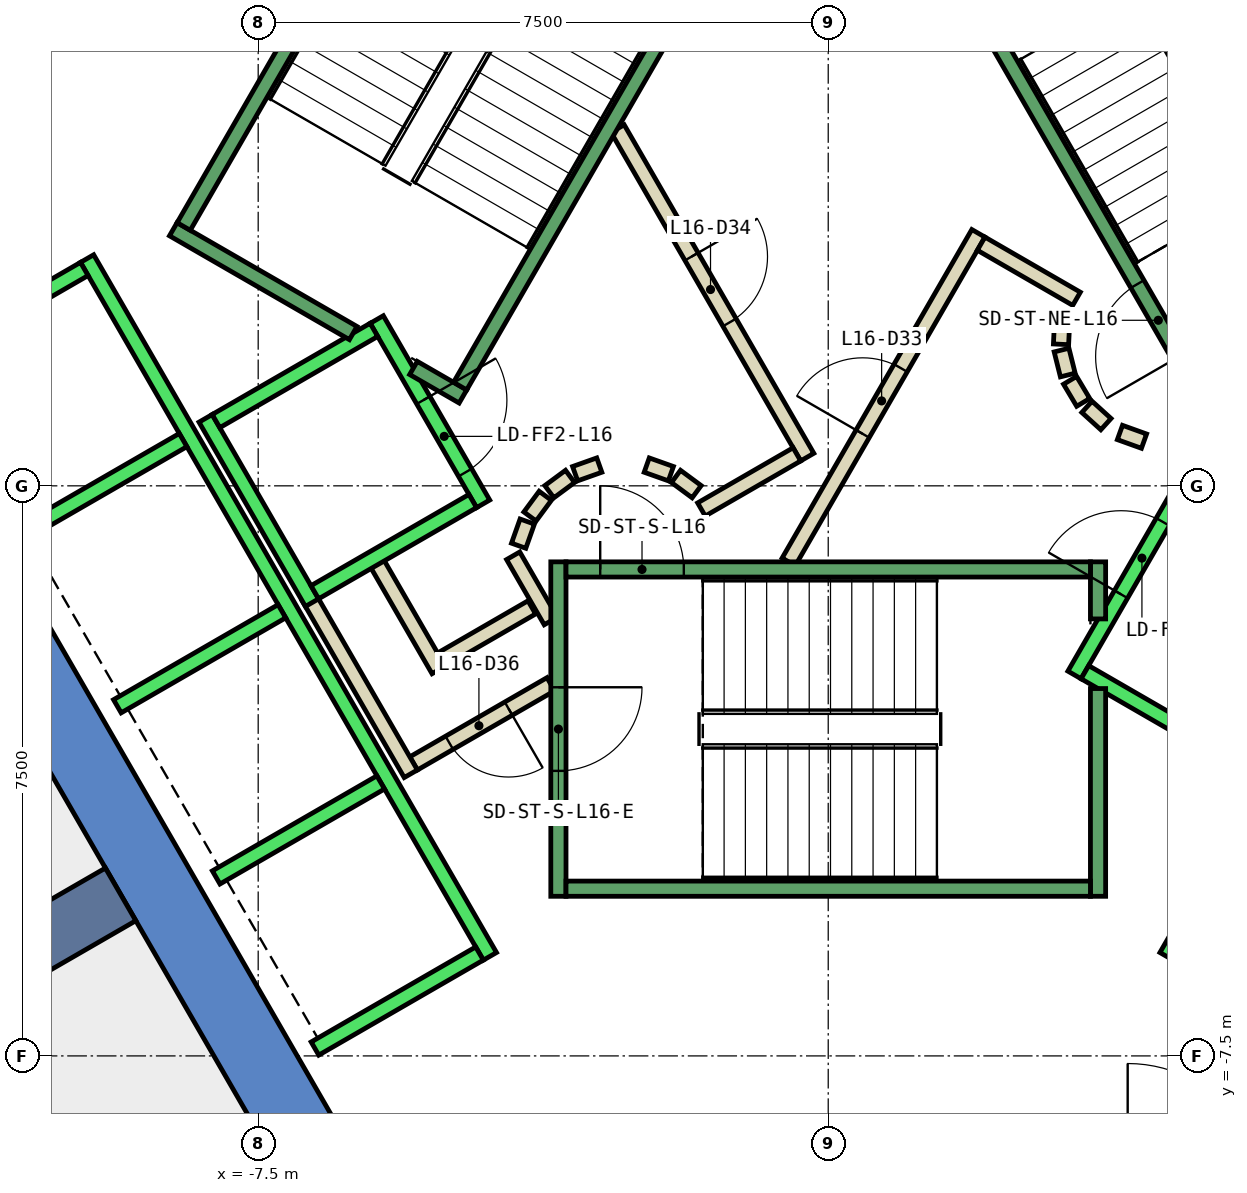
"""IFC4 building model, lengths in metres.
Left out: names, types, materials, properties, quantities, classifications, styles, units other than length and angle.
Written with IfcOpenShell. Run it as: python <this file> out.ifc"""

import sys

from ifc_helpers import new_model, si_unit, direction, frame, frame_2d, origin, place, context, subcontext, project, spatial, polyline, rectangle, outline, extrude, element, fill, save


model = new_model("IFC4")
c1 = context("Model", 3, precision=1e-05, world=origin(), true_north=direction((0.0, 1.0)))
c2 = subcontext(c1, "Body", "Model", "MODEL_VIEW")
j1 = project(units=[si_unit("LENGTHUNIT", "METRE"), si_unit("PLANEANGLEUNIT", "RADIAN")], contexts=[c1])
p1 = place(None, origin())
s1 = spatial("IfcSite", under=j1, at=p1, CompositionType="ELEMENT")
p2 = place(p1, origin())
s2 = spatial("IfcBuilding", under=s1, at=p2, CompositionType="ELEMENT")
p3 = place(p2, frame((0.0, 0.0, 77.0)))
s3 = spatial("IfcBuildingStorey", under=s2, at=p3, CompositionType="ELEMENT", Elevation=77.0)
p4 = place(p3, frame((0.0, 0.0, -0.4)))
e1 = element("IfcWall", 1, at=p4, inside=s3, PredefinedType="SHEAR", context=c2, shape_type="SweptSolid", body=[
    extrude(outline(polyline([(-12.267, 5.252), (-11.444, 4.777), (-6.38, 13.55), (-6.928, 14.5), (-12.267, 5.252)])), origin(), (0.0, 0.0, 1.0), 4.0),
])
p5 = place(p3, frame((0.0, 0.0, -0.4)))
e2 = element("IfcWall", 2, at=p5, inside=s3, PredefinedType="SHEAR", context=c2, shape_type="SweptSolid", body=[
    extrude(outline(polyline([(-13.856, 2.5), (-6.928, -9.5), (-6.38, -8.55), (-12.759, 2.5), (-13.856, 2.5)])), origin(), (0.0, 0.0, 1.0), 4.0),
])
p6 = place(p3, frame((-9.31, -5.375, -0.4), z_axis=(0.0, 0.0, 1.0), x_axis=(-0.866017533419, -0.500013631625, 0.0)))
e3 = element("IfcWall", 3, at=p6, inside=s3, PredefinedType="SHEAR", context=c2, shape_type="SweptSolid", body=[
    extrude(rectangle(XDim=9.0, YDim=0.8, at=frame_2d((4.5, 0.0))), origin(), (0.0, 0.0, 1.0), 4.0),
])
p7 = place(p3, frame((-3.9, -1.599, 0.0), z_axis=(0.0, 0.0, 1.0), x_axis=(-0.865969445389, -0.500096910261, 0.0)))
e4 = element("IfcWall", 4, at=p7, inside=s3, PredefinedType="PARTITIONING", context=c2, shape_type="SweptSolid", body=[
    extrude(rectangle(XDim=1.373, YDim=0.2, at=frame_2d((0.687, 0.0))), origin(), (0.0, 0.0, 1.0), 3.6),
])
p8 = place(p3, frame((-5.126, -2.422, 0.0), z_axis=(0.0, 0.0, 1.0), x_axis=(-0.500062241894, 0.865989465428, 0.0)))
e5 = element("IfcWall", 5, at=p8, inside=s3, PredefinedType="PARTITIONING", context=c2, shape_type="SweptSolid", body=[
    extrude(rectangle(XDim=1.7, YDim=0.2, at=frame_2d((0.85, 0.0))), origin(), (0.0, 0.0, 1.0), 3.6),
])
p9 = place(p3, frame((-3.65, -2.61, 0.0), z_axis=(0.0, 0.0, 1.0), x_axis=(-0.866072462134, -0.499918483688, 0.0)))
e6 = element("IfcWall", 6, at=p9, inside=s3, PredefinedType="PARTITIONING", context=c2, shape_type="SweptSolid", body=[
    extrude(rectangle(XDim=2.084, YDim=0.2, at=frame_2d((1.042, 0.0))), origin(), (0.0, 0.0, 1.0), 3.6),
])
p10 = place(p9, frame((0.642, 0.0, 0.0)))
e7 = element("IfcOpeningElement", 7, at=p10, cuts=e6, PredefinedType="OPENING", context=c2, shape_type="SweptSolid", body=[
    extrude(rectangle(XDim=0.9, YDim=2.1, at=frame_2d((0.45, 1.05))), frame((0.0, 0.11, 0.0), z_axis=(0.0, -1.0, 0.0), x_axis=(1.0, 0.0, 0.0)), (0.0, 0.0, 1.0), 0.22),
])
p11 = place(p3, frame((-5.492, -3.788, 0.0), z_axis=(0.0, 0.0, 1.0), x_axis=(-0.500008949224, 0.866020236886, 0.0)))
e8 = element("IfcWall", 8, at=p11, inside=s3, PredefinedType="PARTITIONING", context=c2, shape_type="SweptSolid", body=[
    extrude(rectangle(XDim=2.68, YDim=0.2, at=frame_2d((1.34, 0.0))), origin(), (0.0, 0.0, 1.0), 3.6),
])
p12 = place(p3, frame((-4.145, -0.92, 0.0), z_axis=(0.0, 0.0, 1.0), x_axis=(0.499743786207, -0.866173278362, 0.0)))
e9 = element("IfcWall", 9, at=p12, inside=s3, PredefinedType="PARTITIONING", context=c2, shape_type="SweptSolid", body=[
    extrude(rectangle(XDim=0.991, YDim=0.2, at=frame_2d((0.495, 0.0))), origin(), (0.0, 0.0, 1.0), 3.6),
])
p13 = place(p3, frame((-0.52, -1.0, 0.0), z_axis=(0.0, 0.0, 1.0), x_axis=(0.50011622646, 0.865958290007, 0.0)))
e10 = element("IfcWall", 10, at=p13, inside=s3, PredefinedType="PARTITIONING", context=c2, shape_type="SweptSolid", body=[
    extrude(rectangle(XDim=4.991, YDim=0.2, at=frame_2d((2.496, 0.0))), origin(), (0.0, 0.0, 1.0), 3.6),
])
p14 = place(p13, frame((1.945, 0.0, 0.0)))
e11 = element("IfcOpeningElement", 11, at=p14, cuts=e10, PredefinedType="OPENING", context=c2, shape_type="SweptSolid", body=[
    extrude(rectangle(XDim=1.0, YDim=2.1, at=frame_2d((0.5, 1.05))), frame((0.0, 0.11, 0.0), z_axis=(0.0, -1.0, 0.0), x_axis=(1.0, 0.0, 0.0)), (0.0, 0.0, 1.0), 0.22),
])
p15 = place(p3, frame((2.012, 3.186, 0.0), z_axis=(0.0, 0.0, 1.0), x_axis=(0.865891012941, -0.500232699559, 0.0)))
e12 = element("IfcWall", 12, at=p15, inside=s3, PredefinedType="PARTITIONING", context=c2, shape_type="SweptSolid", body=[
    extrude(rectangle(XDim=1.449, YDim=0.2, at=frame_2d((0.725, 0.0))), origin(), (0.0, 0.0, 1.0), 3.6),
])
p16 = place(p3, frame((3.079, 2.199, 0.0), z_axis=(0.0, 0.0, 1.0), x_axis=(-0.047771483479, -0.998858290933, 0.0)))
e13 = element("IfcWall", 13, at=p16, inside=s3, PredefinedType="PARTITIONING", context=c2, shape_type="SweptSolid", body=[
    extrude(rectangle(XDim=0.337, YDim=0.2, at=frame_2d((0.169, 0.0))), origin(), (0.0, 0.0, 1.0), 3.6),
])
p17 = place(p3, frame((3.07, 1.786, 0.0), z_axis=(0.0, 0.0, 1.0), x_axis=(0.242705583207, -0.970099994784, 0.0)))
e14 = element("IfcWall", 14, at=p17, inside=s3, PredefinedType="PARTITIONING", context=c2, shape_type="SweptSolid", body=[
    extrude(rectangle(XDim=0.338, YDim=0.2, at=frame_2d((0.169, 0.0))), origin(), (0.0, 0.0, 1.0), 3.6),
])
for number, where, z_axis, x_axis in (
    (15, (3.182, 1.388, 0.0), (0.0, 0.0, 1.0), (0.512, -0.859, 0.0)),
    (16, (3.404, 1.039, 0.0), (0.0, 0.0, 1.0), (0.74, -0.672, 0.0)),
):
    element("IfcWall", number, at=place(p3, frame(where, z_axis=z_axis, x_axis=x_axis)), inside=s3, PredefinedType="PARTITIONING", context=c2, shape_type="SweptSolid", body=[
        extrude(rectangle(XDim=0.338, YDim=0.2, at=frame_2d((0.169, 0.0))), origin(), (0.0, 0.0, 1.0), 3.6),
    ])
p18 = place(p3, frame((3.838, 0.702, 0.0), z_axis=(0.0, 0.0, 1.0), x_axis=(0.941035081519, -0.338308993895, 0.0)))
e17 = element("IfcWall", 17, at=p18, inside=s3, PredefinedType="PARTITIONING", context=c2, shape_type="SweptSolid", body=[
    extrude(rectangle(XDim=0.337, YDim=0.2, at=frame_2d((0.168, 0.0))), origin(), (0.0, 0.0, 1.0), 3.6),
])
p19 = place(p3, frame((-2.771, 4.7, 0.0), z_axis=(0.0, 0.0, 1.0), x_axis=(0.499969479948, -0.866043023828, 0.0)))
e18 = element("IfcWall", 18, at=p19, inside=s3, PredefinedType="PARTITIONING", context=c2, shape_type="SweptSolid", body=[
    extrude(rectangle(XDim=4.99, YDim=0.2, at=frame_2d((2.495, 0.0))), origin(), (0.0, 0.0, 1.0), 3.6),
])
p20 = place(p19, frame((1.945, 0.0, 0.0)))
e19 = element("IfcOpeningElement", 19, at=p20, cuts=e18, PredefinedType="OPENING", context=c2, shape_type="SweptSolid", body=[
    extrude(rectangle(XDim=1.0, YDim=2.1, at=frame_2d((0.5, 1.05))), frame((0.0, 0.11, 0.0), z_axis=(0.0, -1.0, 0.0), x_axis=(1.0, 0.0, 0.0)), (0.0, 0.0, 1.0), 0.22),
])
p21 = place(p3, frame((-0.412, 0.414, 0.0), z_axis=(0.0, 0.0, 1.0), x_axis=(-0.866017369001, -0.500013916395, 0.0)))
e20 = element("IfcWall", 20, at=p21, inside=s3, PredefinedType="PARTITIONING", context=c2, shape_type="SweptSolid", body=[
    extrude(rectangle(XDim=1.45, YDim=0.2, at=frame_2d((0.725, 0.0))), origin(), (0.0, 0.0, 1.0), 3.6),
])
p22 = place(p3, frame((-1.731, -0.077, 0.0), z_axis=(0.0, 0.0, 1.0), x_axis=(-0.804311165252, 0.594208338422, 0.0)))
e21 = element("IfcWall", 21, at=p22, inside=s3, PredefinedType="PARTITIONING", context=c2, shape_type="SweptSolid", body=[
    extrude(rectangle(XDim=0.338, YDim=0.2, at=frame_2d((0.169, 0.0))), origin(), (0.0, 0.0, 1.0), 3.6),
])
p23 = place(p3, frame((-2.07, 0.16, 0.0), z_axis=(0.0, 0.0, 1.0), x_axis=(-0.942199461132, 0.335052496547, 0.0)))
e22 = element("IfcWall", 22, at=p23, inside=s3, PredefinedType="PARTITIONING", context=c2, shape_type="SweptSolid", body=[
    extrude(rectangle(XDim=0.337, YDim=0.2, at=frame_2d((0.169, 0.0))), origin(), (0.0, 0.0, 1.0), 3.6),
])
p24 = place(p3, frame((-3.012, 0.273, 0.0), z_axis=(0.0, 0.0, 1.0), x_axis=(-0.942280615813, -0.334824194261, 0.0)))
e23 = element("IfcWall", 23, at=p24, inside=s3, PredefinedType="PARTITIONING", context=c2, shape_type="SweptSolid", body=[
    extrude(rectangle(XDim=0.338, YDim=0.2, at=frame_2d((0.169, 0.0))), origin(), (0.0, 0.0, 1.0), 3.6),
])
p25 = place(p3, frame((-3.397, 0.124, 0.0), z_axis=(0.0, 0.0, 1.0), x_axis=(-0.804311165252, -0.594208338422, 0.0)))
e24 = element("IfcWall", 24, at=p25, inside=s3, PredefinedType="PARTITIONING", context=c2, shape_type="SweptSolid", body=[
    extrude(rectangle(XDim=0.338, YDim=0.2, at=frame_2d((0.169, 0.0))), origin(), (0.0, 0.0, 1.0), 3.6),
])
p26 = place(p3, frame((-3.723, -0.131, 0.0), z_axis=(0.0, 0.0, 1.0), x_axis=(-0.594675113454, -0.803966112121, 0.0)))
e25 = element("IfcWall", 25, at=p26, inside=s3, PredefinedType="PARTITIONING", context=c2, shape_type="SweptSolid", body=[
    extrude(rectangle(XDim=0.338, YDim=0.2, at=frame_2d((0.169, 0.0))), origin(), (0.0, 0.0, 1.0), 3.6),
])
p27 = place(p3, frame((-3.96, -0.47, 0.0), z_axis=(0.0, 0.0, 1.0), x_axis=(-0.334824194261, -0.942280615813, 0.0)))
e26 = element("IfcWall", 26, at=p27, inside=s3, PredefinedType="PARTITIONING", context=c2, shape_type="SweptSolid", body=[
    extrude(rectangle(XDim=0.338, YDim=0.2, at=frame_2d((0.169, 0.0))), origin(), (0.0, 0.0, 1.0), 3.6),
])
p28 = place(p3, frame((-5.94, 2.188, 0.0), z_axis=(0.0, 0.0, 1.0), x_axis=(0.49994636267, -0.866056369097, 0.0)))
e27 = element("IfcWall", 27, at=p28, inside=s3, PredefinedType="STANDARD", context=c2, shape_type="SweptSolid", body=[
    extrude(rectangle(XDim=2.8, YDim=0.2, at=frame_2d((1.4, 0.0))), origin(), (0.0, 0.0, 1.0), 3.6),
])
p29 = place(p28, frame((1.225, 0.0, 0.0)))
e28 = element("IfcOpeningElement", 28, at=p29, cuts=e27, PredefinedType="OPENING", context=c2, shape_type="SweptSolid", body=[
    extrude(rectangle(XDim=1.1, YDim=2.1, at=frame_2d((0.55, 1.05))), frame((0.0, 0.11, 0.0), z_axis=(0.0, -1.0, 0.0), x_axis=(1.0, 0.0, 0.0)), (0.0, 0.0, 1.0), 0.22),
])
p30 = place(p3, frame((-8.192, 0.888, 0.0), z_axis=(0.0, 0.0, 1.0), x_axis=(0.49994636267, -0.866056369097, 0.0)))
e29 = element("IfcWall", 29, at=p30, inside=s3, PredefinedType="STANDARD", context=c2, shape_type="SweptSolid", body=[
    extrude(rectangle(XDim=2.8, YDim=0.2, at=frame_2d((1.4, 0.0))), origin(), (0.0, 0.0, 1.0), 3.6),
])
for number, where, z_axis, x_axis in (
    (30, (-5.977, 2.052, 0.0), (0.0, 0.0, 1.0), (-0.866, -0.5, 0.0)),
    (31, (-4.677, -0.2, 0.0), (0.0, 0.0, 1.0), (-0.866, -0.5, 0.0)),
):
    element("IfcWall", number, at=place(p3, frame(where, z_axis=z_axis, x_axis=x_axis)), inside=s3, PredefinedType="STANDARD", context=c2, shape_type="SweptSolid", body=[
        extrude(rectangle(XDim=2.399, YDim=0.2, at=frame_2d((1.2, 0.0))), origin(), (0.0, 0.0, 1.0), 3.6),
    ])
p31 = place(p3, frame((-9.751, 2.99, 0.0), z_axis=(0.0, 0.0, 1.0), x_axis=(0.50000090737, -0.866024879913, 0.0)))
e32 = element("IfcWall", 32, at=p31, inside=s3, PredefinedType="STANDARD", context=c2, shape_type="SweptSolid", body=[
    extrude(rectangle(XDim=10.6, YDim=0.2, at=frame_2d((5.3, 0.0))), origin(), (0.0, 0.0, 1.0), 3.6),
])
p32 = place(p3, frame((-9.788, 2.853, 0.0), z_axis=(0.0, 0.0, 1.0), x_axis=(-0.865998541277, -0.500046524342, 0.0)))
e33 = element("IfcWall", 33, at=p32, inside=s3, PredefinedType="STANDARD", context=c2, shape_type="SweptSolid", body=[
    extrude(rectangle(XDim=2.5, YDim=0.2, at=frame_2d((1.25, 0.0))), origin(), (0.0, 0.0, 1.0), 3.6),
])
for number, where, z_axis, x_axis in (
    (34, (-8.488, 0.602, 0.0), (0.0, 0.0, 1.0), (-0.866, -0.5, 0.0)),
    (35, (-7.188, -1.65, 0.0), (0.0, 0.0, 1.0), (-0.866, -0.5, 0.0)),
    (36, (-5.888, -3.902, 0.0), (0.0, 0.0, 1.0), (-0.866, -0.5, 0.0)),
    (37, (-4.588, -6.153, 0.0), (0.0, 0.0, 1.0), (-0.866, -0.5, 0.0)),
):
    element("IfcWall", number, at=place(p3, frame(where, z_axis=z_axis, x_axis=x_axis)), inside=s3, PredefinedType="STANDARD", context=c2, shape_type="SweptSolid", body=[
        extrude(rectangle(XDim=2.5, YDim=0.2, at=frame_2d((1.25, 0.0))), origin(), (0.0, 0.0, 1.0), 3.6),
    ])
p33 = place(p3, frame((3.24, -2.488, 0.0), z_axis=(0.0, 0.0, 1.0), x_axis=(0.49994636267, 0.866056369097, 0.0)))
e38 = element("IfcWall", 38, at=p33, inside=s3, PredefinedType="STANDARD", context=c2, shape_type="SweptSolid", body=[
    extrude(rectangle(XDim=2.8, YDim=0.2, at=frame_2d((1.4, 0.0))), origin(), (0.0, 0.0, 1.0), 3.6),
])
p34 = place(p33, frame((1.225, 0.0, 0.0)))
e39 = element("IfcOpeningElement", 39, at=p34, cuts=e38, PredefinedType="OPENING", context=c2, shape_type="SweptSolid", body=[
    extrude(rectangle(XDim=1.1, YDim=2.1, at=frame_2d((0.55, 1.05))), frame((0.0, 0.11, 0.0), z_axis=(0.0, -1.0, 0.0), x_axis=(1.0, 0.0, 0.0)), (0.0, 0.0, 1.0), 0.22),
])
p35 = place(p3, frame((3.377, -2.452, 0.0), z_axis=(0.0, 0.0, 1.0), x_axis=(0.865955154139, -0.50012165622, 0.0)))
e40 = element("IfcWall", 40, at=p35, inside=s3, PredefinedType="STANDARD", context=c2, shape_type="SweptSolid", body=[
    extrude(rectangle(XDim=2.4, YDim=0.2, at=frame_2d((1.2, 0.0))), origin(), (0.0, 0.0, 1.0), 3.6),
])
p36 = place(p3, frame((4.451, -6.19, 0.0), z_axis=(0.0, 0.0, 1.0), x_axis=(0.50000090737, 0.866024879913, 0.0)))
e41 = element("IfcWall", 41, at=p36, inside=s3, PredefinedType="STANDARD", context=c2, shape_type="SweptSolid", body=[
    extrude(rectangle(XDim=10.6, YDim=0.2, at=frame_2d((5.3, 0.0))), origin(), (0.0, 0.0, 1.0), 3.6),
])
p37 = place(p3, frame((-3.55, -1.0, 0.0), z_axis=(0.0, 0.0, 1.0), x_axis=(0.0, -1.0, 0.0)))
e42 = element("IfcWall", 42, at=p37, inside=s3, PredefinedType="STANDARD", context=c2, shape_type="SweptSolid", body=[
    extrude(rectangle(XDim=4.4, YDim=0.2, at=frame_2d((2.2, 0.0))), origin(), (0.0, 0.0, 1.0), 3.6),
])
p38 = place(p37, frame((1.65, 0.0, 0.0)))
e43 = element("IfcOpeningElement", 43, at=p38, cuts=e42, PredefinedType="OPENING", context=c2, shape_type="SweptSolid", body=[
    extrude(rectangle(XDim=1.1, YDim=2.2, at=frame_2d((0.55, 1.1))), frame((0.0, 0.11, 0.0), z_axis=(0.0, -1.0, 0.0), x_axis=(1.0, 0.0, 0.0)), (0.0, 0.0, 1.0), 0.22),
])
p39 = place(p3, frame((3.55, -2.667, 0.0), z_axis=(0.0, 0.0, 1.0), x_axis=(0.0, -1.0, 0.0)))
e44 = element("IfcWall", 44, at=p39, inside=s3, PredefinedType="STANDARD", context=c2, shape_type="SweptSolid", body=[
    extrude(rectangle(XDim=2.733, YDim=0.2, at=frame_2d((1.366, 0.0))), origin(), (0.0, 0.0, 1.0), 3.6),
])
p40 = place(p3, frame((3.55, -1.0, 0.0), z_axis=(0.0, 0.0, 1.0), x_axis=(0.0, -1.0, 0.0)))
e45 = element("IfcWall", 45, at=p40, inside=s3, PredefinedType="STANDARD", context=c2, shape_type="SweptSolid", body=[
    extrude(rectangle(XDim=0.751, YDim=0.2, at=frame_2d((0.375, 0.0))), origin(), (0.0, 0.0, 1.0), 3.6),
])
p41 = place(p3, frame((-3.45, -1.1, 0.0), z_axis=(0.0, 0.0, 1.0), x_axis=(1.0, 0.0, 0.0)))
e46 = element("IfcWall", 46, at=p41, inside=s3, PredefinedType="STANDARD", context=c2, shape_type="SweptSolid", body=[
    extrude(rectangle(XDim=6.9, YDim=0.2, at=frame_2d((3.45, 0.0))), origin(), (0.0, 0.0, 1.0), 3.6),
])
p42 = place(p41, frame((0.45, 0.0, 0.0)))
e47 = element("IfcOpeningElement", 47, at=p42, cuts=e46, PredefinedType="OPENING", context=c2, shape_type="SweptSolid", body=[
    extrude(rectangle(XDim=1.1, YDim=2.2, at=frame_2d((0.55, 1.1))), frame((0.0, 0.11, 0.0), z_axis=(0.0, -1.0, 0.0), x_axis=(1.0, 0.0, 0.0)), (0.0, 0.0, 1.0), 0.22),
])
p43 = place(p3, frame((-3.45, -5.3, 0.0), z_axis=(0.0, 0.0, 1.0), x_axis=(1.0, 0.0, 0.0)))
e48 = element("IfcWall", 48, at=p43, inside=s3, PredefinedType="STANDARD", context=c2, shape_type="SweptSolid", body=[
    extrude(rectangle(XDim=6.9, YDim=0.2, at=frame_2d((3.45, 0.0))), origin(), (0.0, 0.0, 1.0), 3.6),
])
p44 = place(p3, frame((4.843, 1.312, 0.0), z_axis=(0.0, 0.0, 1.0), x_axis=(-0.499963383562, 0.866046543262, 0.0)))
e49 = element("IfcWall", 49, at=p44, inside=s3, PredefinedType="STANDARD", context=c2, shape_type="SweptSolid", body=[
    extrude(rectangle(XDim=6.9, YDim=0.2, at=frame_2d((3.45, 0.0))), origin(), (0.0, 0.0, 1.0), 3.6),
])
p45 = place(p44, frame((0.45, 0.0, 0.0)))
e50 = element("IfcOpeningElement", 50, at=p45, cuts=e49, PredefinedType="OPENING", context=c2, shape_type="SweptSolid", body=[
    extrude(rectangle(XDim=1.1, YDim=2.2, at=frame_2d((0.55, 1.1))), frame((0.0, 0.11, 0.0), z_axis=(0.0, -1.0, 0.0), x_axis=(1.0, 0.0, 0.0)), (0.0, 0.0, 1.0), 0.22),
])
p46 = place(p3, frame((-6.25, 2.01, 0.0), z_axis=(0.0, 0.0, 1.0), x_axis=(-0.86611865017, 0.499838457731, 0.0)))
e51 = element("IfcWall", 51, at=p46, inside=s3, PredefinedType="STANDARD", context=c2, shape_type="SweptSolid", body=[
    extrude(rectangle(XDim=2.733, YDim=0.2, at=frame_2d((1.366, 0.0))), origin(), (0.0, 0.0, 1.0), 3.6),
])
p47 = place(p3, frame((-4.806, 1.176, 0.0), z_axis=(0.0, 0.0, 1.0), x_axis=(-0.866558586415, 0.499075361355, 0.0)))
e52 = element("IfcWall", 52, at=p47, inside=s3, PredefinedType="STANDARD", context=c2, shape_type="SweptSolid", body=[
    extrude(rectangle(XDim=0.751, YDim=0.2, at=frame_2d((0.376, 0.0))), origin(), (0.0, 0.0, 1.0), 3.6),
])
p48 = place(p3, frame((-1.393, 7.288, 0.0), z_axis=(0.0, 0.0, 1.0), x_axis=(-0.499963383562, -0.866046543262, 0.0)))
e53 = element("IfcWall", 53, at=p48, inside=s3, PredefinedType="STANDARD", context=c2, shape_type="SweptSolid", body=[
    extrude(rectangle(XDim=6.9, YDim=0.2, at=frame_2d((3.45, 0.0))), origin(), (0.0, 0.0, 1.0), 3.6),
])
p49 = place(p48, frame((0.45, 0.0, 0.0)))
e54 = element("IfcOpeningElement", 54, at=p49, cuts=e53, PredefinedType="OPENING", context=c2, shape_type="SweptSolid", body=[
    extrude(rectangle(XDim=1.1, YDim=2.2, at=frame_2d((0.55, 1.1))), frame((0.0, 0.11, 0.0), z_axis=(0.0, -1.0, 0.0), x_axis=(1.0, 0.0, 0.0)), (0.0, 0.0, 1.0), 0.22),
])
p50 = place(p3, frame((-5.03, 9.388, 0.0), z_axis=(0.0, 0.0, 1.0), x_axis=(-0.499978703459, -0.866037698999, 0.0)))
e55 = element("IfcWall", 55, at=p50, inside=s3, PredefinedType="STANDARD", context=c2, shape_type="SweptSolid", body=[
    extrude(rectangle(XDim=6.9, YDim=0.2, at=frame_2d((3.45, 0.0))), origin(), (0.0, 0.0, 1.0), 3.6),
])
p51 = place(p14, origin())
e56 = element("IfcDoor", 56, at=p51, inside=s3, OperationType="SINGLE_SWING_LEFT", PredefinedType="DOOR", context=c2, shape_type="SweptSolid", body=[
    extrude(rectangle(XDim=1.0, YDim=2.1, at=frame_2d((0.5, 1.05))), frame((0.0, 0.025, 0.0), z_axis=(0.0, -1.0, 0.0), x_axis=(1.0, 0.0, 0.0)), (0.0, 0.0, 1.0), 0.05),
])
fill(e11, e56)
p52 = place(p20, origin())
e57 = element("IfcDoor", 57, at=p52, inside=s3, OperationType="SINGLE_SWING_RIGHT", PredefinedType="DOOR", context=c2, shape_type="SweptSolid", body=[
    extrude(rectangle(XDim=1.0, YDim=2.1, at=frame_2d((0.5, 1.05))), frame((0.0, 0.025, 0.0), z_axis=(0.0, -1.0, 0.0), x_axis=(1.0, 0.0, 0.0)), (0.0, 0.0, 1.0), 0.05),
])
fill(e19, e57)
p53 = place(p10, origin())
e58 = element("IfcDoor", 58, at=p53, inside=s3, OperationType="SINGLE_SWING_LEFT", PredefinedType="DOOR", context=c2, shape_type="SweptSolid", body=[
    extrude(rectangle(XDim=0.9, YDim=2.1, at=frame_2d((0.45, 1.05))), frame((0.0, 0.025, 0.0), z_axis=(0.0, -1.0, 0.0), x_axis=(1.0, 0.0, 0.0)), (0.0, 0.0, 1.0), 0.05),
])
fill(e7, e58)
p54 = place(p34, origin())
e59 = element("IfcDoor", 59, at=p54, inside=s3, OperationType="SLIDING_TO_LEFT", PredefinedType="DOOR", context=c2, shape_type="SweptSolid", body=[
    extrude(rectangle(XDim=1.1, YDim=2.1, at=frame_2d((0.55, 1.05))), frame((0.0, 0.025, 0.0), z_axis=(0.0, -1.0, 0.0), x_axis=(1.0, 0.0, 0.0)), (0.0, 0.0, 1.0), 0.05),
])
fill(e39, e59)
p55 = place(p29, origin())
e60 = element("IfcDoor", 60, at=p55, inside=s3, OperationType="SLIDING_TO_LEFT", PredefinedType="DOOR", context=c2, shape_type="SweptSolid", body=[
    extrude(rectangle(XDim=1.1, YDim=2.1, at=frame_2d((0.55, 1.05))), frame((0.0, 0.025, 0.0), z_axis=(0.0, -1.0, 0.0), x_axis=(1.0, 0.0, 0.0)), (0.0, 0.0, 1.0), 0.05),
])
fill(e28, e60)
p56 = place(p42, origin())
e61 = element("IfcDoor", 61, at=p56, inside=s3, OperationType="SINGLE_SWING_LEFT", PredefinedType="DOOR", context=c2, shape_type="SweptSolid", body=[
    extrude(rectangle(XDim=1.1, YDim=2.2, at=frame_2d((0.55, 1.1))), frame((0.0, 0.025, 0.0), z_axis=(0.0, -1.0, 0.0), x_axis=(1.0, 0.0, 0.0)), (0.0, 0.0, 1.0), 0.05),
])
fill(e47, e61)
p57 = place(p38, origin())
e62 = element("IfcDoor", 62, at=p57, inside=s3, OperationType="SINGLE_SWING_LEFT", PredefinedType="DOOR", context=c2, shape_type="SweptSolid", body=[
    extrude(rectangle(XDim=1.1, YDim=2.2, at=frame_2d((0.55, 1.1))), frame((0.0, 0.025, 0.0), z_axis=(0.0, -1.0, 0.0), x_axis=(1.0, 0.0, 0.0)), (0.0, 0.0, 1.0), 0.05),
])
fill(e43, e62)
p58 = place(p45, origin())
e63 = element("IfcDoor", 63, at=p58, inside=s3, OperationType="SINGLE_SWING_LEFT", PredefinedType="DOOR", context=c2, shape_type="SweptSolid", body=[
    extrude(rectangle(XDim=1.1, YDim=2.2, at=frame_2d((0.55, 1.1))), frame((0.0, 0.025, 0.0), z_axis=(0.0, -1.0, 0.0), x_axis=(1.0, 0.0, 0.0)), (0.0, 0.0, 1.0), 0.05),
])
fill(e50, e63)
save(model, sys.argv[1])
